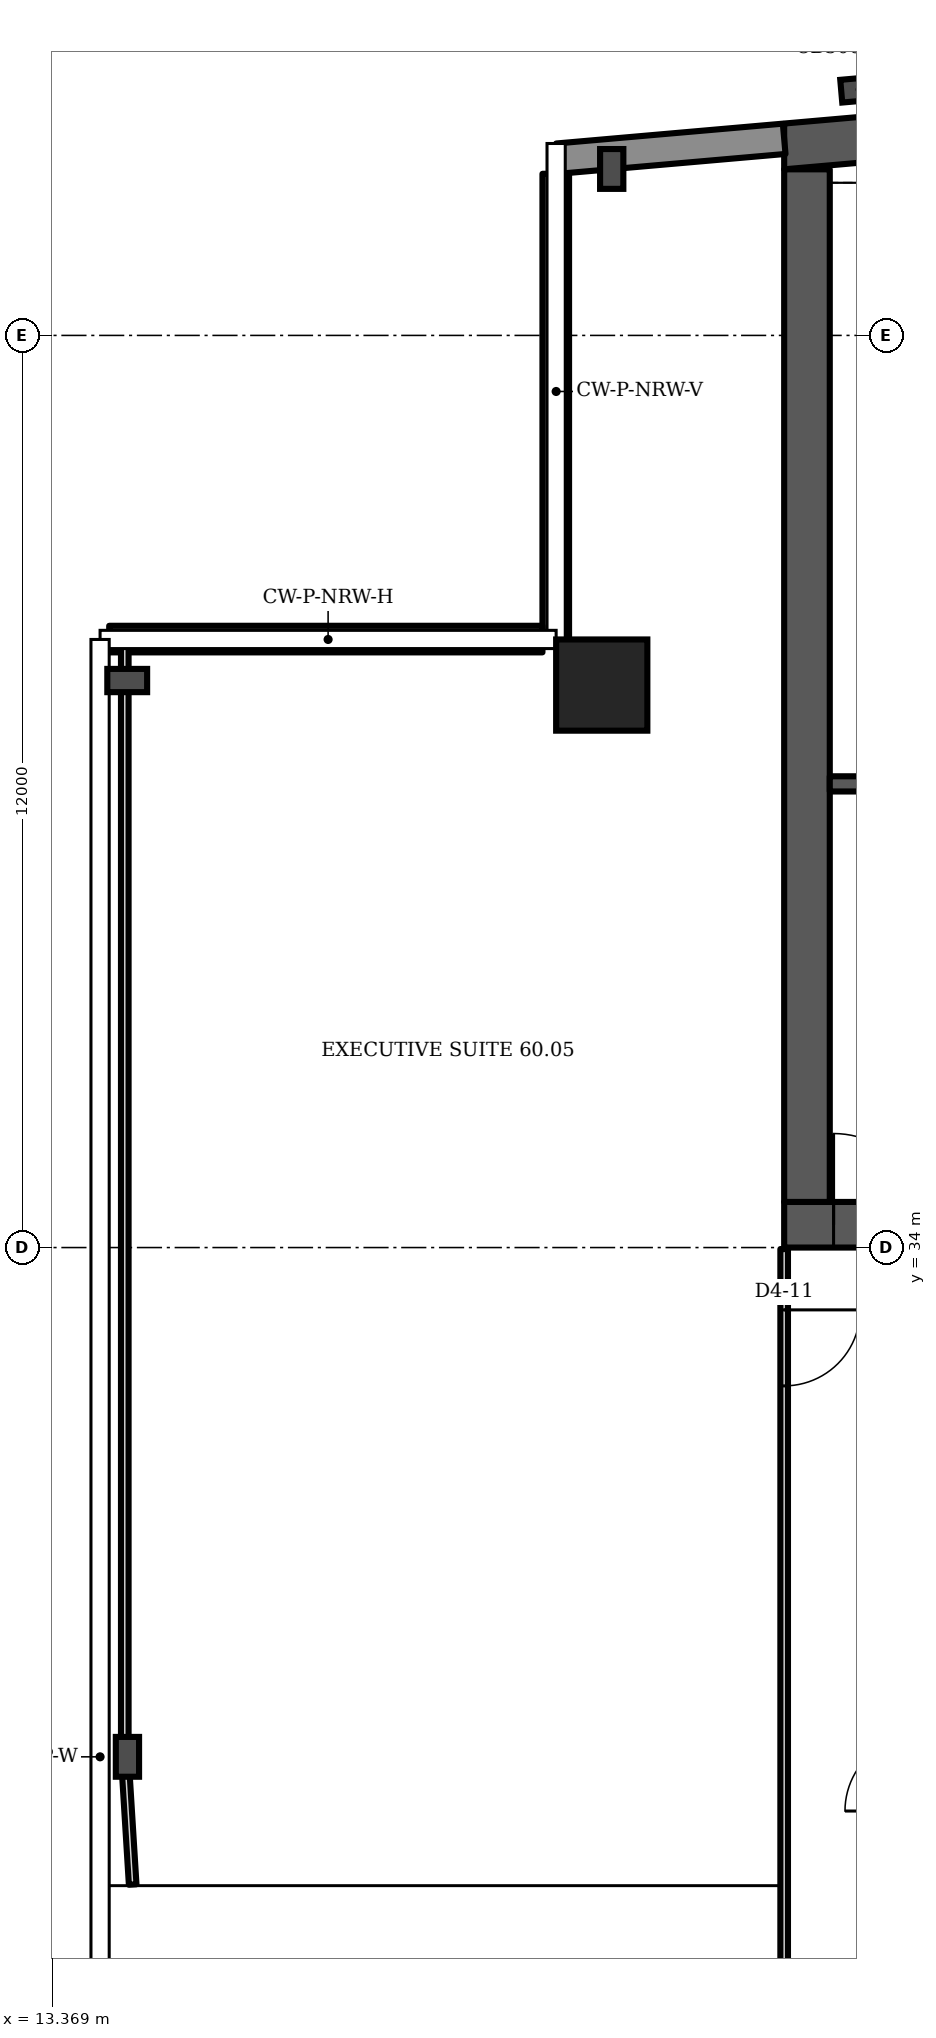
"""IFC4 building model, lengths in metres.
Left out: names, types, materials, properties, quantities, classifications, styles, units other than length and angle.
Written with IfcOpenShell. Run it as: python <this file> out.ifc"""

import sys

from ifc_helpers import new_model, si_unit, direction, frame, frame_2d, origin, origin_2d, place, context, subcontext, project, spatial, polyline, rectangle, i_section, outline, extrude, element, fill, save


model = new_model("IFC4")
c1 = context("Model", 3, precision=1e-05, world=origin(), true_north=direction((0.0, 1.0)))
c2 = subcontext(c1, "Body", "Model", "MODEL_VIEW")
j1 = project(units=[si_unit("LENGTHUNIT", "METRE"), si_unit("PLANEANGLEUNIT", "RADIAN")], contexts=[c1])
p1 = place(None, origin())
s1 = spatial("IfcSite", under=j1, at=p1, CompositionType="ELEMENT")
p2 = place(p1, origin())
s2 = spatial("IfcBuilding", under=s1, at=p2, CompositionType="ELEMENT")
p3 = place(p2, frame((0.0, 0.0, 239.5)))
s3 = spatial("IfcBuildingStorey", under=s2, at=p3, CompositionType="ELEMENT", Elevation=239.5)
p4 = place(p3, origin())
e1 = element("IfcWall", 1, at=p4, inside=s3, PredefinedType="SHEAR", context=c2, shape_type="SweptSolid", body=[
    extrude(outline(polyline([(23.0, 48.185), (40.5, 49.716), (58.0, 48.185), (58.0, 48.787), (40.5, 50.318), (23.0, 48.787), (23.0, 48.185)])), origin(), (0.0, 0.0, 1.0), 3.6),
])
p5 = place(p3, frame((23.0, 34.3, 0.0), z_axis=(0.0, 0.0, 1.0), x_axis=(1.0, 0.0, 0.0)))
e2 = element("IfcWall", 2, at=p5, inside=s3, PredefinedType="SHEAR", context=c2, shape_type="SweptSolid", body=[
    extrude(rectangle(XDim=35.0, YDim=0.6, at=frame_2d((17.5, 0.0))), origin(), (0.0, 0.0, 1.0), 3.6),
])
p6 = place(p5, frame((0.65, 0.0, 0.0)))
e3 = element("IfcOpeningElement", 3, at=p6, cuts=e2, PredefinedType="OPENING", context=c2, shape_type="SweptSolid", body=[
    extrude(rectangle(XDim=1.2, YDim=2.1, at=frame_2d((0.6, 1.05))), frame((0.0, 0.31, 0.0), z_axis=(0.0, -1.0, 0.0), x_axis=(1.0, 0.0, 0.0)), (0.0, 0.0, 1.0), 0.62),
])
p7 = place(p5, frame((7.717, 0.0, 0.0)))
e4 = element("IfcOpeningElement", 4, at=p7, cuts=e2, PredefinedType="OPENING", context=c2, shape_type="SweptSolid", body=[
    extrude(rectangle(XDim=1.1, YDim=2.1, at=frame_2d((0.55, 1.05))), frame((0.0, 0.31, 0.0), z_axis=(0.0, -1.0, 0.0), x_axis=(1.0, 0.0, 0.0)), (0.0, 0.0, 1.0), 0.62),
])
p8 = place(p5, frame((12.183, 0.0, 0.0)))
e5 = element("IfcOpeningElement", 5, at=p8, cuts=e2, PredefinedType="OPENING", context=c2, shape_type="SweptSolid", body=[
    extrude(rectangle(XDim=1.1, YDim=2.1, at=frame_2d((0.55, 1.05))), frame((0.0, 0.31, 0.0), z_axis=(0.0, -1.0, 0.0), x_axis=(1.0, 0.0, 0.0)), (0.0, 0.0, 1.0), 0.62),
])
p9 = place(p5, frame((9.8, 0.0, 0.0)))
e6 = element("IfcOpeningElement", 6, at=p9, cuts=e2, PredefinedType="OPENING", context=c2, shape_type="SweptSolid", body=[
    extrude(rectangle(XDim=1.4, YDim=2.1, at=frame_2d((0.7, 1.05))), frame((0.0, 0.31, 0.0), z_axis=(0.0, -1.0, 0.0), x_axis=(1.0, 0.0, 0.0)), (0.0, 0.0, 1.0), 0.62),
])
p10 = place(p5, frame((14.717, 0.0, 0.0)))
e7 = element("IfcOpeningElement", 7, at=p10, cuts=e2, PredefinedType="OPENING", context=c2, shape_type="SweptSolid", body=[
    extrude(rectangle(XDim=1.1, YDim=2.1, at=frame_2d((0.55, 1.05))), frame((0.0, 0.31, 0.0), z_axis=(0.0, -1.0, 0.0), x_axis=(1.0, 0.0, 0.0)), (0.0, 0.0, 1.0), 0.62),
])
p11 = place(p5, frame((16.95, 0.0, 0.0)))
e8 = element("IfcOpeningElement", 8, at=p11, cuts=e2, PredefinedType="OPENING", context=c2, shape_type="SweptSolid", body=[
    extrude(rectangle(XDim=1.1, YDim=2.1, at=frame_2d((0.55, 1.05))), frame((0.0, 0.31, 0.0), z_axis=(0.0, -1.0, 0.0), x_axis=(1.0, 0.0, 0.0)), (0.0, 0.0, 1.0), 0.62),
])
p12 = place(p5, frame((19.183, 0.0, 0.0)))
e9 = element("IfcOpeningElement", 9, at=p12, cuts=e2, PredefinedType="OPENING", context=c2, shape_type="SweptSolid", body=[
    extrude(rectangle(XDim=1.1, YDim=2.1, at=frame_2d((0.55, 1.05))), frame((0.0, 0.31, 0.0), z_axis=(0.0, -1.0, 0.0), x_axis=(1.0, 0.0, 0.0)), (0.0, 0.0, 1.0), 0.62),
])
p13 = place(p5, frame((26.15, 0.0, 0.0)))
e10 = element("IfcOpeningElement", 10, at=p13, cuts=e2, PredefinedType="OPENING", context=c2, shape_type="SweptSolid", body=[
    extrude(rectangle(XDim=1.2, YDim=2.1, at=frame_2d((0.6, 1.05))), frame((0.0, 0.31, 0.0), z_axis=(0.0, -1.0, 0.0), x_axis=(1.0, 0.0, 0.0)), (0.0, 0.0, 1.0), 0.62),
])
p14 = place(p5, frame((28.767, 0.0, 0.0)))
e11 = element("IfcOpeningElement", 11, at=p14, cuts=e2, PredefinedType="OPENING", context=c2, shape_type="SweptSolid", body=[
    extrude(rectangle(XDim=1.0, YDim=2.1, at=frame_2d((0.5, 1.05))), frame((0.0, 0.31, 0.0), z_axis=(0.0, -1.0, 0.0), x_axis=(1.0, 0.0, 0.0)), (0.0, 0.0, 1.0), 0.62),
])
p15 = place(p5, frame((33.083, 0.0, 0.0)))
e12 = element("IfcOpeningElement", 12, at=p15, cuts=e2, PredefinedType="OPENING", context=c2, shape_type="SweptSolid", body=[
    extrude(rectangle(XDim=1.0, YDim=2.1, at=frame_2d((0.5, 1.05))), frame((0.0, 0.31, 0.0), z_axis=(0.0, -1.0, 0.0), x_axis=(1.0, 0.0, 0.0)), (0.0, 0.0, 1.0), 0.62),
])
p16 = place(p5, frame((30.8, 0.0, 0.0)))
e13 = element("IfcOpeningElement", 13, at=p16, cuts=e2, PredefinedType="OPENING", context=c2, shape_type="SweptSolid", body=[
    extrude(rectangle(XDim=1.4, YDim=2.1, at=frame_2d((0.7, 1.05))), frame((0.0, 0.31, 0.0), z_axis=(0.0, -1.0, 0.0), x_axis=(1.0, 0.0, 0.0)), (0.0, 0.0, 1.0), 0.62),
])
p17 = place(p3, frame((23.3, 34.6, 0.0), z_axis=(0.0, 0.0, 1.0), x_axis=(0.0, 1.0, 0.0)))
e14 = element("IfcWall", 14, at=p17, inside=s3, PredefinedType="SHEAR", context=c2, shape_type="SweptSolid", body=[
    extrude(rectangle(XDim=13.585, YDim=0.6, at=frame_2d((6.792, 0.0))), origin(), (0.0, 0.0, 1.0), 3.6),
])
p18 = place(p3, frame((20.6, 41.4, 0.0), z_axis=(0.0, 0.0, 1.0), x_axis=(1.0, 0.0, 0.0)))
e15 = element("IfcColumn", 15, at=p18, inside=s3, PredefinedType="COLUMN", context=c2, shape_type="SweptSolid", body=[
    extrude(rectangle(XDim=1.2, YDim=1.2, at=origin_2d()), origin(), (0.0, 0.0, 1.0), 3.6),
])
for number, where, z_axis, x_axis in (
    (16, (20.731, 48.19, 0.0), (0.0, 0.0, 1.0), (-1.0, 0.0, 0.0)),
    (17, (14.357, 41.46, 0.0), (0.0, 0.0, 1.0), (0.0, 1.0, 0.0)),
    (18, (14.36, 27.3, 0.0), (0.0, 0.0, 1.0), (-1.0, 0.0, 0.0)),
):
    element("IfcColumn", number, at=place(p3, frame(where, z_axis=z_axis, x_axis=x_axis)), inside=s3, PredefinedType="COLUMN", context=c2, shape_type="SweptSolid", body=[
        extrude(i_section(OverallWidth=0.306, OverallDepth=0.524, WebThickness=0.021, FlangeThickness=0.04, FilletRadius=0.027, at=origin_2d()), origin(), (0.0, 0.0, 1.0), 3.6),
    ])
p19 = place(p3, frame((24.0, 49.235, 0.0), z_axis=(0.0, 0.0, 1.0), x_axis=(-0.087156, 0.996197, 0.0)))
e19 = element("IfcColumn", 19, at=p19, inside=s3, PredefinedType="COLUMN", context=c2, shape_type="SweptSolid", body=[
    extrude(i_section(OverallWidth=0.3, OverallDepth=0.5, WebThickness=0.014, FlangeThickness=0.028, FilletRadius=0.027, at=origin_2d()), origin(), (0.0, 0.0, 1.0), 3.6),
])
p20 = place(p3, frame((23.0, 48.587, 0.0), z_axis=(0.0, 0.0, 1.0), x_axis=(-0.996194, -0.087168, 0.0)))
e20 = element("IfcWall", 20, at=p20, inside=s3, PredefinedType="SOLIDWALL", context=c2, shape_type="SweptSolid", body=[
    extrude(rectangle(XDim=2.994, YDim=0.4, at=frame_2d((1.497, 0.0))), origin(), (0.0, 0.0, 1.0), 3.2),
])
p21 = place(p3, frame((19.995, 48.126, 0.0), z_axis=(0.0, 0.0, 1.0), x_axis=(0.0, -1.0, 0.0)))
e21 = element("IfcWall", 21, at=p21, inside=s3, PredefinedType="SOLIDWALL", context=c2, shape_type="SweptSolid", body=[
    extrude(rectangle(XDim=6.126, YDim=0.35, at=frame_2d((3.063, 0.0))), origin(), (0.0, 0.0, 1.0), 1.0),
])
p22 = place(p3, frame((19.82, 42.005, 0.0), z_axis=(0.0, 0.0, 1.0), x_axis=(-1.0, 0.0, 0.0)))
e22 = element("IfcWall", 22, at=p22, inside=s3, PredefinedType="SOLIDWALL", context=c2, shape_type="SweptSolid", body=[
    extrude(rectangle(XDim=5.7, YDim=0.35, at=frame_2d((2.85, 0.0))), origin(), (0.0, 0.0, 1.0), 1.0),
])
p23 = place(p3, frame((23.6, 40.1, 0.0), z_axis=(0.0, 0.0, 1.0), x_axis=(1.0, 0.0, 0.0)))
e23 = element("IfcWall", 23, at=p23, inside=s3, PredefinedType="SHEAR", context=c2, shape_type="SweptSolid", body=[
    extrude(rectangle(XDim=6.1, YDim=0.2, at=frame_2d((3.05, 0.0))), origin(), (0.0, 0.0, 1.0), 3.2),
])
p24 = place(p23, frame((3.325, 0.0, 0.0)))
e24 = element("IfcOpeningElement", 24, at=p24, cuts=e23, PredefinedType="OPENING", context=c2, shape_type="SweptSolid", body=[
    extrude(rectangle(XDim=1.2, YDim=2.1, at=frame_2d((0.6, 1.05))), frame((0.0, 0.11, 0.0), z_axis=(0.0, -1.0, 0.0), x_axis=(1.0, 0.0, 0.0)), (0.0, 0.0, 1.0), 0.22),
])
p25 = place(p23, frame((0.475, 0.0, 0.0)))
e25 = element("IfcOpeningElement", 25, at=p25, cuts=e23, PredefinedType="OPENING", context=c2, shape_type="SweptSolid", body=[
    extrude(rectangle(XDim=0.9, YDim=2.1, at=frame_2d((0.45, 1.05))), frame((0.0, 0.11, 0.0), z_axis=(0.0, -1.0, 0.0), x_axis=(1.0, 0.0, 0.0)), (0.0, 0.0, 1.0), 0.22),
])
p26 = place(p3, frame((14.325, 27.3, 0.0), z_axis=(0.0, 0.0, 1.0), x_axis=(0.0, 1.0, 0.0)))
e26 = element("IfcWall", 26, at=p26, inside=s3, PredefinedType="PARTITIONING", context=c2, shape_type="SweptSolid", body=[
    extrude(rectangle(XDim=14.68, YDim=0.1, at=frame_2d((7.34, 0.0))), origin(), (0.0, 0.0, 1.0), 2.58),
])
p27 = place(p3, frame((14.429, 25.62, 0.0), z_axis=(0.0, 0.0, 1.0), x_axis=(-0.061647, 0.998101, 0.0)))
e27 = element("IfcWall", 27, at=p27, inside=s3, PredefinedType="PARTITIONING", context=c2, shape_type="SweptSolid", body=[
    extrude(rectangle(XDim=1.683, YDim=0.1, at=frame_2d((0.842, 0.0))), origin(), (0.0, 0.0, 1.0), 3.2),
])
p28 = place(p3, frame((23.0, 24.275, 0.0), z_axis=(0.0, 0.0, 1.0), x_axis=(0.0, 1.0, 0.0)))
e28 = element("IfcWall", 28, at=p28, inside=s3, PredefinedType="PARTITIONING", context=c2, shape_type="SweptSolid", body=[
    extrude(rectangle(XDim=9.705, YDim=0.1, at=frame_2d((4.853, 0.0))), origin(), (0.0, 0.0, 1.0), 3.2),
])
p29 = place(p28, frame((7.905, 0.0, 0.0)))
e29 = element("IfcOpeningElement", 29, at=p29, cuts=e28, PredefinedType="OPENING", context=c2, shape_type="SweptSolid", body=[
    extrude(rectangle(XDim=1.0, YDim=2.1, at=frame_2d((0.5, 1.05))), frame((0.0, 0.06, 0.0), z_axis=(0.0, -1.0, 0.0), x_axis=(1.0, 0.0, 0.0)), (0.0, 0.0, 1.0), 0.12),
])
p30 = place(p6, origin())
e30 = element("IfcDoor", 30, at=p30, inside=s3, OperationType="SINGLE_SWING_LEFT", PredefinedType="DOOR", context=c2, shape_type="SweptSolid", body=[
    extrude(rectangle(XDim=1.2, YDim=2.1, at=frame_2d((0.6, 1.05))), frame((0.0, 0.025, 0.0), z_axis=(0.0, -1.0, 0.0), x_axis=(1.0, 0.0, 0.0)), (0.0, 0.0, 1.0), 0.05),
])
fill(e3, e30)
p31 = place(p29, origin())
e31 = element("IfcDoor", 31, at=p31, inside=s3, OperationType="SINGLE_SWING_RIGHT", PredefinedType="DOOR", context=c2, shape_type="SweptSolid", body=[
    extrude(rectangle(XDim=1.0, YDim=2.1, at=frame_2d((0.5, 1.05))), frame((0.0, 0.025, 0.0), z_axis=(0.0, -1.0, 0.0), x_axis=(1.0, 0.0, 0.0)), (0.0, 0.0, 1.0), 0.05),
])
fill(e29, e31)
save(model, sys.argv[1])
